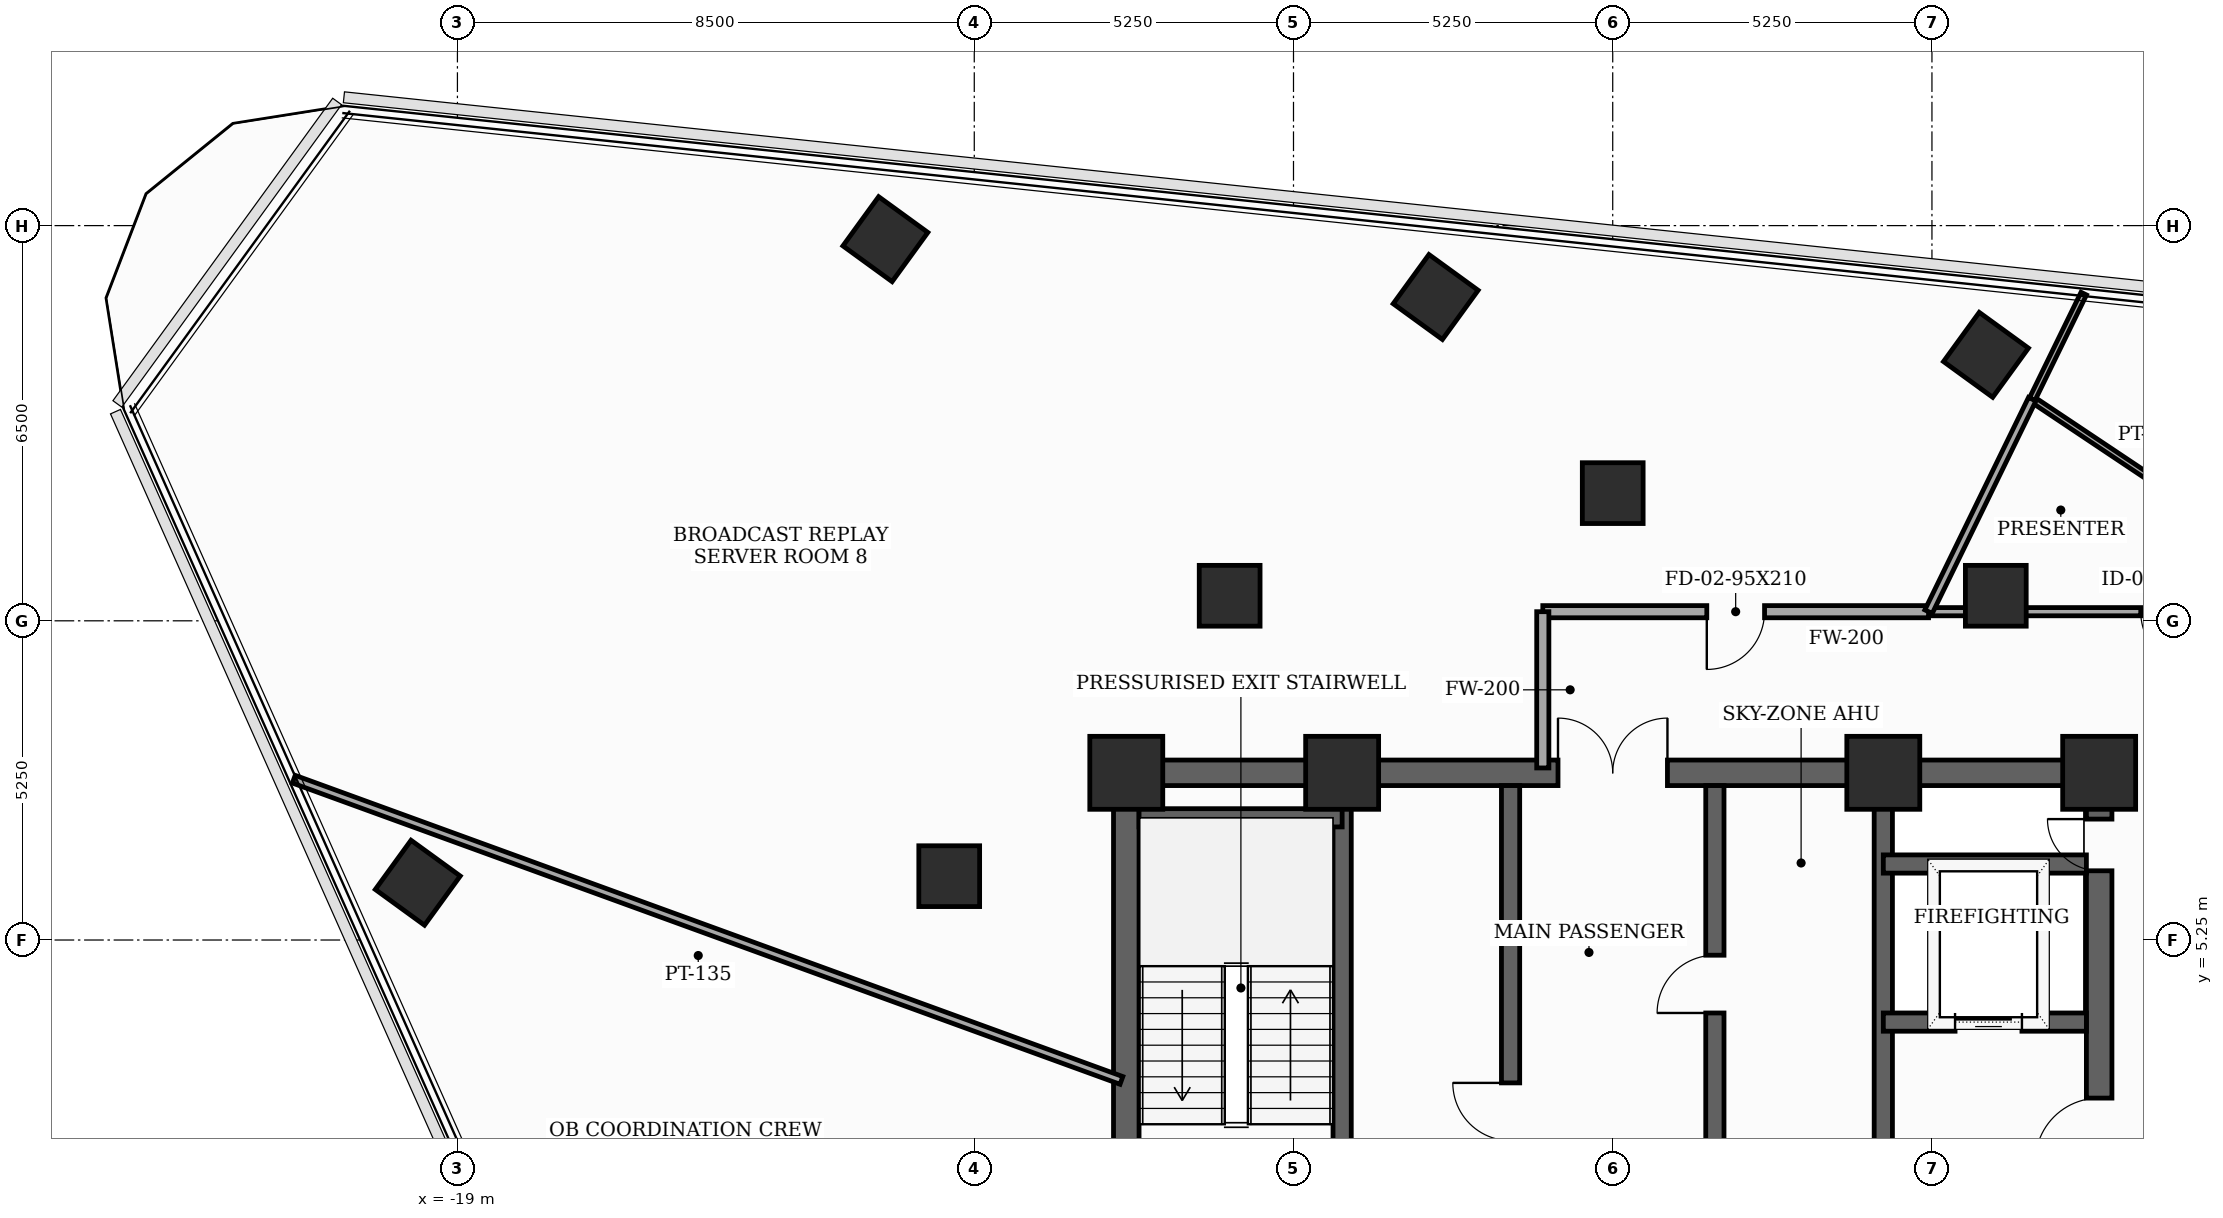
"""IFC4 building model, lengths in metres.
Left out: names, types, materials, properties, quantities, classifications, styles, units other than length and angle.
Written with IfcOpenShell. Run it as: python <this file> out.ifc"""

import sys

from ifc_helpers import new_model, si_unit, direction, frame, frame_2d, origin, origin_2d, place, context, subcontext, project, spatial, rectangle, extrude, element, fill, save


model = new_model("IFC4")
c1 = context("Model", 3, precision=1e-05, world=origin(), true_north=direction((0.0, 1.0)))
c2 = subcontext(c1, "Body", "Model", "MODEL_VIEW")
j1 = project(units=[si_unit("LENGTHUNIT", "METRE"), si_unit("PLANEANGLEUNIT", "RADIAN")], contexts=[c1])
p1 = place(None, origin())
s1 = spatial("IfcSite", under=j1, at=p1, CompositionType="ELEMENT")
p2 = place(p1, origin())
s2 = spatial("IfcBuilding", under=s1, at=p2, CompositionType="ELEMENT")
p3 = place(p2, frame((0.0, 0.0, 244.8)))
s3 = spatial("IfcBuildingStorey", under=s2, at=p3, CompositionType="ELEMENT", Elevation=244.8)
for number, where, z_axis, x_axis in (
    (1, (8.0, 8.0, 0.0), (0.0, 0.0, 1.0), (1.0, 0.0, 0.0)),
    (2, (4.45, 8.0, 0.0), (0.0, 0.0, 1.0), (1.0, 0.0, 0.0)),
    (3, (-4.45, 8.0, 0.0), (0.0, 0.0, 1.0), (1.0, 0.0, 0.0)),
    (4, (-8.0, 8.0, 0.0), (0.0, 0.0, 1.0), (1.0, 0.0, 0.0)),
):
    element("IfcColumn", number, at=place(p3, frame(where, z_axis=z_axis, x_axis=x_axis)), inside=s3, PredefinedType="COLUMN", context=c2, shape_type="SweptSolid", body=[
        extrude(rectangle(XDim=1.2, YDim=1.2, at=origin_2d()), origin(), (0.0, 0.0, 1.0), 3.7),
    ])
for number, where, z_axis, x_axis in (
    (5, (6.3, 10.912, 0.0), (0.0, 0.0, 1.0), (1.0, 0.0, 0.0)),
    (6, (0.0, 12.6, 0.0), (0.0, 0.0, 1.0), (1.0, 0.0, 0.0)),
    (7, (-6.3, 10.912, 0.0), (0.0, 0.0, 1.0), (1.0, 0.0, 0.0)),
    (8, (-10.912, 6.3, 0.0), (0.0, 0.0, 1.0), (1.0, 0.0, 0.0)),
    (9, (6.138, 14.875, 0.0), (0.0, 0.0, 1.0), (0.588, 0.809, 0.0)),
    (10, (-2.912, 15.826, 0.0), (0.0, 0.0, 1.0), (0.588, 0.809, 0.0)),
    (11, (-11.962, 16.777, 0.0), (0.0, 0.0, 1.0), (0.588, 0.809, 0.0)),
    (12, (-19.652, 6.192, 0.0), (0.0, 0.0, 1.0), (0.588, 0.809, 0.0)),
):
    element("IfcColumn", number, at=place(p3, frame(where, z_axis=z_axis, x_axis=x_axis)), inside=s3, PredefinedType="COLUMN", context=c2, shape_type="SweptSolid", body=[
        extrude(rectangle(XDim=1.0, YDim=1.0, at=origin_2d()), origin(), (0.0, 0.0, 1.0), 3.7),
    ])
p4 = place(p3, frame((-8.0, -8.0, 0.0), z_axis=(0.0, 0.0, 1.0), x_axis=(0.0, 1.0, 0.0)))
e13 = element("IfcWall", 13, at=p4, inside=s3, PredefinedType="SHEAR", context=c2, shape_type="SweptSolid", body=[
    extrude(rectangle(XDim=16.0, YDim=0.42, at=frame_2d((8.0, 0.0))), origin(), (0.0, 0.0, 1.0), 3.5),
])
p5 = place(p4, frame((0.761, 0.0, 0.0)))
e14 = element("IfcOpeningElement", 14, at=p5, cuts=e13, PredefinedType="OPENING", context=c2, shape_type="SweptSolid", body=[
    extrude(rectangle(XDim=0.85, YDim=2.02, at=frame_2d((0.425, 1.01))), frame((0.0, 0.22, 0.0), z_axis=(0.0, -1.0, 0.0), x_axis=(1.0, 0.0, 0.0)), (0.0, 0.0, 1.0), 0.44),
])
p6 = place(p4, frame((5.35, 0.0, 0.0)))
e15 = element("IfcOpeningElement", 15, at=p6, cuts=e13, PredefinedType="OPENING", context=c2, shape_type="SweptSolid", body=[
    extrude(rectangle(XDim=1.05, YDim=2.15, at=frame_2d((0.525, 1.075))), frame((0.0, 0.22, 0.0), z_axis=(0.0, -1.0, 0.0), x_axis=(1.0, 0.0, 0.0)), (0.0, 0.0, 1.0), 0.44),
])
p7 = place(p3, frame((8.0, -8.0, 0.0), z_axis=(0.0, 0.0, 1.0), x_axis=(0.0, 1.0, 0.0)))
e16 = element("IfcWall", 16, at=p7, inside=s3, PredefinedType="SHEAR", context=c2, shape_type="SweptSolid", body=[
    extrude(rectangle(XDim=16.0, YDim=0.42, at=frame_2d((8.0, 0.0))), origin(), (0.0, 0.0, 1.0), 3.5),
])
p8 = place(p7, frame((9.6, 0.0, 0.0)))
e17 = element("IfcOpeningElement", 17, at=p8, cuts=e16, PredefinedType="OPENING", context=c2, shape_type="SweptSolid", body=[
    extrude(rectangle(XDim=1.05, YDim=2.15, at=frame_2d((0.525, 1.075))), frame((0.0, 0.22, 0.0), z_axis=(0.0, -1.0, 0.0), x_axis=(1.0, 0.0, 0.0)), (0.0, 0.0, 1.0), 0.44),
])
p9 = place(p7, frame((14.389, 0.0, 0.0)))
e18 = element("IfcOpeningElement", 18, at=p9, cuts=e16, PredefinedType="OPENING", context=c2, shape_type="SweptSolid", body=[
    extrude(rectangle(XDim=0.85, YDim=2.02, at=frame_2d((0.425, 1.01))), frame((0.0, 0.22, 0.0), z_axis=(0.0, -1.0, 0.0), x_axis=(1.0, 0.0, 0.0)), (0.0, 0.0, 1.0), 0.44),
])
p10 = place(p3, frame((-8.0, 8.0, 0.0), z_axis=(0.0, 0.0, 1.0), x_axis=(1.0, 0.0, 0.0)))
e19 = element("IfcWall", 19, at=p10, inside=s3, PredefinedType="SHEAR", context=c2, shape_type="SweptSolid", body=[
    extrude(rectangle(XDim=16.0, YDim=0.42, at=frame_2d((8.0, 0.0))), origin(), (0.0, 0.0, 1.0), 3.5),
])
p11 = place(p10, frame((7.1, 0.0, 0.0)))
e20 = element("IfcOpeningElement", 20, at=p11, cuts=e19, PredefinedType="OPENING", context=c2, shape_type="SweptSolid", body=[
    extrude(rectangle(XDim=1.8, YDim=2.15, at=frame_2d((0.9, 1.075))), frame((0.0, 0.22, 0.0), z_axis=(0.0, -1.0, 0.0), x_axis=(1.0, 0.0, 0.0)), (0.0, 0.0, 1.0), 0.44),
])
for number, where, z_axis, x_axis in (
    (21, (-4.45, -7.79, 0.0), (0.0, 0.0, 1.0), (0.0, 1.0, 0.0)),
    (22, (4.45, -7.79, 0.0), (0.0, 0.0, 1.0), (0.0, 1.0, 0.0)),
):
    element("IfcWall", number, at=place(p3, frame(where, z_axis=z_axis, x_axis=x_axis)), inside=s3, PredefinedType="SHEAR", context=c2, shape_type="SweptSolid", body=[
        extrude(rectangle(XDim=15.58, YDim=0.3, at=frame_2d((7.79, 0.0))), origin(), (0.0, 0.0, 1.0), 3.5),
    ])
p12 = place(p3, frame((-7.79, 7.26, 0.0), z_axis=(0.0, 0.0, 1.0), x_axis=(1.0, 0.0, 0.0)))
e23 = element("IfcWall", 23, at=p12, inside=s3, PredefinedType="SHEAR", context=c2, shape_type="SweptSolid", body=[
    extrude(rectangle(XDim=3.34, YDim=0.3, at=frame_2d((1.67, 0.0))), origin(), (0.0, 0.0, 1.0), 3.5),
])
p13 = place(p3, frame((4.45, 3.9, 0.0), z_axis=(0.0, 0.0, 1.0), x_axis=(1.0, 0.0, 0.0)))
e24 = element("IfcWall", 24, at=p13, inside=s3, PredefinedType="SHEAR", context=c2, shape_type="SweptSolid", body=[
    extrude(rectangle(XDim=3.34, YDim=0.3, at=frame_2d((1.67, 0.0))), origin(), (0.0, 0.0, 1.0), 3.5),
])
p14 = place(p13, frame((1.18, 0.0, 0.0)))
e25 = element("IfcOpeningElement", 25, at=p14, cuts=e24, PredefinedType="OPENING", context=c2, shape_type="SweptSolid", body=[
    extrude(rectangle(XDim=1.1, YDim=2.1, at=frame_2d((0.55, 1.05))), frame((0.0, 0.16, 0.0), z_axis=(0.0, -1.0, 0.0), x_axis=(1.0, 0.0, 0.0)), (0.0, 0.0, 1.0), 0.32),
])
p15 = place(p3, frame((4.45, 6.5, 0.0), z_axis=(0.0, 0.0, 1.0), x_axis=(1.0, 0.0, 0.0)))
e26 = element("IfcWall", 26, at=p15, inside=s3, PredefinedType="SHEAR", context=c2, shape_type="SweptSolid", body=[
    extrude(rectangle(XDim=3.34, YDim=0.3, at=frame_2d((1.67, 0.0))), origin(), (0.0, 0.0, 1.0), 3.5),
])
p16 = place(p3, frame((-1.68, -4.85, 0.0), z_axis=(0.0, 0.0, 1.0), x_axis=(0.0, 1.0, 0.0)))
e27 = element("IfcWall", 27, at=p16, inside=s3, PredefinedType="SHEAR", context=c2, shape_type="SweptSolid", body=[
    extrude(rectangle(XDim=12.64, YDim=0.3, at=frame_2d((6.32, 0.0))), origin(), (0.0, 0.0, 1.0), 3.5),
])
p17 = place(p16, frame((1.05, 0.0, 0.0)))
e28 = element("IfcOpeningElement", 28, at=p17, cuts=e27, PredefinedType="OPENING", context=c2, shape_type="SweptSolid", body=[
    extrude(rectangle(XDim=0.85, YDim=2.02, at=frame_2d((0.425, 1.01))), frame((0.0, 0.16, 0.0), z_axis=(0.0, -1.0, 0.0), x_axis=(1.0, 0.0, 0.0)), (0.0, 0.0, 1.0), 0.32),
])
p18 = place(p16, frame((6.8, 0.0, 0.0)))
e29 = element("IfcOpeningElement", 29, at=p18, cuts=e27, PredefinedType="OPENING", context=c2, shape_type="SweptSolid", body=[
    extrude(rectangle(XDim=0.95, YDim=2.1, at=frame_2d((0.475, 1.05))), frame((0.0, 0.16, 0.0), z_axis=(0.0, -1.0, 0.0), x_axis=(1.0, 0.0, 0.0)), (0.0, 0.0, 1.0), 0.32),
])
p19 = place(p3, frame((1.68, -4.85, 0.0), z_axis=(0.0, 0.0, 1.0), x_axis=(0.0, 1.0, 0.0)))
e30 = element("IfcWall", 30, at=p19, inside=s3, PredefinedType="SHEAR", context=c2, shape_type="SweptSolid", body=[
    extrude(rectangle(XDim=12.64, YDim=0.3, at=frame_2d((6.32, 0.0))), origin(), (0.0, 0.0, 1.0), 3.5),
])
p20 = place(p19, frame((0.55, 0.0, 0.0)))
e31 = element("IfcOpeningElement", 31, at=p20, cuts=e30, PredefinedType="OPENING", context=c2, shape_type="SweptSolid", body=[
    extrude(rectangle(XDim=1.1, YDim=2.1, at=frame_2d((0.55, 1.05))), frame((0.0, 0.16, 0.0), z_axis=(0.0, -1.0, 0.0), x_axis=(1.0, 0.0, 0.0)), (0.0, 0.0, 1.0), 0.32),
])
p21 = place(p19, frame((2.65, 0.0, 0.0)))
e32 = element("IfcOpeningElement", 32, at=p21, cuts=e30, PredefinedType="OPENING", context=c2, shape_type="SweptSolid", body=[
    extrude(rectangle(XDim=1.1, YDim=2.1, at=frame_2d((0.55, 1.05))), frame((0.0, 0.16, 0.0), z_axis=(0.0, -1.0, 0.0), x_axis=(1.0, 0.0, 0.0)), (0.0, 0.0, 1.0), 0.32),
])
p22 = place(p19, frame((4.75, 0.0, 0.0)))
e33 = element("IfcOpeningElement", 33, at=p22, cuts=e30, PredefinedType="OPENING", context=c2, shape_type="SweptSolid", body=[
    extrude(rectangle(XDim=1.1, YDim=2.1, at=frame_2d((0.55, 1.05))), frame((0.0, 0.16, 0.0), z_axis=(0.0, -1.0, 0.0), x_axis=(1.0, 0.0, 0.0)), (0.0, 0.0, 1.0), 0.32),
])
p23 = place(p19, frame((8.9, 0.0, 0.0)))
e34 = element("IfcOpeningElement", 34, at=p23, cuts=e30, PredefinedType="OPENING", context=c2, shape_type="SweptSolid", body=[
    extrude(rectangle(XDim=0.95, YDim=2.1, at=frame_2d((0.475, 1.05))), frame((0.0, 0.16, 0.0), z_axis=(0.0, -1.0, 0.0), x_axis=(1.0, 0.0, 0.0)), (0.0, 0.0, 1.0), 0.32),
])
p24 = place(p3, frame((10.15, 10.65, 0.0), z_axis=(0.0, 0.0, 1.0), x_axis=(-1.0, 0.0, 0.0)))
e35 = element("IfcWall", 35, at=p24, inside=s3, PredefinedType="PARTITIONING", context=c2, shape_type="SweptSolid", body=[
    extrude(rectangle(XDim=4.956, YDim=0.135, at=frame_2d((2.478, 0.0))), origin(), (0.0, 0.0, 1.0), 2.885),
])
p25 = place(p24, frame((0.516, 0.0, 0.0)))
e36 = element("IfcOpeningElement", 36, at=p25, cuts=e35, PredefinedType="OPENING", context=c2, shape_type="SweptSolid", body=[
    extrude(rectangle(XDim=0.95, YDim=2.1, at=frame_2d((0.475, 1.05))), frame((0.0, 0.077, 0.0), z_axis=(0.0, -1.0, 0.0), x_axis=(1.0, 0.0, 0.0)), (0.0, 0.0, 1.0), 0.155),
])
p26 = place(p3, frame((5.194, 10.65, 0.0), z_axis=(0.0, 0.0, 1.0), x_axis=(-1.0, 0.0, 0.0)))
e37 = element("IfcWall", 37, at=p26, inside=s3, PredefinedType="SOLIDWALL", context=c2, shape_type="SweptSolid", body=[
    extrude(rectangle(XDim=6.344, YDim=0.2, at=frame_2d((3.172, 0.0))), origin(), (0.0, 0.0, 1.0), 2.885),
])
p27 = place(p26, frame((2.697, 0.0, 0.0)))
e38 = element("IfcOpeningElement", 38, at=p27, cuts=e37, PredefinedType="OPENING", context=c2, shape_type="SweptSolid", body=[
    extrude(rectangle(XDim=0.95, YDim=2.1, at=frame_2d((0.475, 1.05))), frame((0.0, 0.11, 0.0), z_axis=(0.0, -1.0, 0.0), x_axis=(1.0, 0.0, 0.0)), (0.0, 0.0, 1.0), 0.22),
])
p28 = place(p3, frame((-1.15, 10.65, 0.0), z_axis=(0.0, 0.0, 1.0), x_axis=(0.0, -1.0, 0.0)))
e39 = element("IfcWall", 39, at=p28, inside=s3, PredefinedType="SOLIDWALL", context=c2, shape_type="SweptSolid", body=[
    extrude(rectangle(XDim=2.57, YDim=0.2, at=frame_2d((1.285, 0.0))), origin(), (0.0, 0.0, 1.0), 2.885),
])
p29 = place(p3, frame((-8.08, 2.941, 0.0), z_axis=(0.0, 0.0, 1.0), x_axis=(-0.939685602892, 0.342039424216, 0.0)))
e40 = element("IfcWall", 40, at=p29, inside=s3, PredefinedType="PARTITIONING", context=c2, shape_type="SweptSolid", body=[
    extrude(rectangle(XDim=14.485, YDim=0.135, at=frame_2d((7.242, 0.0))), origin(), (0.0, 0.0, 1.0), 2.085),
])
p30 = place(p3, frame((6.899, 14.145, 0.0), z_axis=(0.0, 0.0, 1.0), x_axis=(0.831510168033, -0.555509532283, 0.0)))
e41 = element("IfcWall", 41, at=p30, inside=s3, PredefinedType="MOVABLE", context=c2, shape_type="SweptSolid", body=[
    extrude(rectangle(XDim=4.663, YDim=0.1, at=frame_2d((2.331, 0.0))), origin(), (0.0, 0.0, 1.0), 3.5),
])
p31 = place(p3, frame((7.747, 15.882, 0.0), z_axis=(0.0, 0.0, 1.0), x_axis=(-0.438553034404, -0.898705310998, 0.0)))
e42 = element("IfcWall", 42, at=p31, inside=s3, PredefinedType="MOVABLE", context=c2, shape_type="SweptSolid", body=[
    extrude(rectangle(XDim=1.933, YDim=0.1, at=frame_2d((0.966, 0.0))), origin(), (0.0, 0.0, 1.0), 2.085),
])
p32 = place(p3, frame((6.899, 14.145, 0.0), z_axis=(0.0, 0.0, 1.0), x_axis=(-0.438402604201, -0.898778702813, 0.0)))
e43 = element("IfcWall", 43, at=p32, inside=s3, PredefinedType="PARTITIONING", context=c2, shape_type="SweptSolid", body=[
    extrude(rectangle(XDim=3.889, YDim=0.135, at=frame_2d((1.944, 0.0))), origin(), (0.0, 0.0, 1.0), 2.085),
])
p33 = place(p8, origin())
e44 = element("IfcDoor", 44, at=p33, inside=s3, OperationType="SINGLE_SWING_LEFT", PredefinedType="DOOR", context=c2, shape_type="SweptSolid", body=[
    extrude(rectangle(XDim=1.05, YDim=2.15, at=frame_2d((0.525, 1.075))), frame((0.0, 0.025, 0.0), z_axis=(0.0, -1.0, 0.0), x_axis=(1.0, 0.0, 0.0)), (0.0, 0.0, 1.0), 0.05),
])
fill(e17, e44)
p34 = place(p9, origin())
e45 = element("IfcDoor", 45, at=p34, inside=s3, OperationType="SINGLE_SWING_RIGHT", PredefinedType="TRAPDOOR", context=c2, shape_type="SweptSolid", body=[
    extrude(rectangle(XDim=0.85, YDim=2.02, at=frame_2d((0.425, 1.01))), frame((0.0, 0.025, 0.0), z_axis=(0.0, -1.0, 0.0), x_axis=(1.0, 0.0, 0.0)), (0.0, 0.0, 1.0), 0.05),
])
fill(e18, e45)
p35 = place(p11, origin())
e46 = element("IfcDoor", 46, at=p35, inside=s3, OperationType="DOUBLE_DOOR_SINGLE_SWING", PredefinedType="DOOR", context=c2, shape_type="SweptSolid", body=[
    extrude(rectangle(XDim=1.8, YDim=2.15, at=frame_2d((0.9, 1.075))), frame((0.0, 0.025, 0.0), z_axis=(0.0, -1.0, 0.0), x_axis=(1.0, 0.0, 0.0)), (0.0, 0.0, 1.0), 0.05),
])
fill(e20, e46)
p36 = place(p14, origin())
e47 = element("IfcDoor", 47, at=p36, inside=s3, OperationType="SLIDING_TO_LEFT", PredefinedType="DOOR", context=c2, shape_type="SweptSolid", body=[
    extrude(rectangle(XDim=1.1, YDim=2.1, at=frame_2d((0.55, 1.05))), frame((0.0, 0.025, 0.0), z_axis=(0.0, -1.0, 0.0), x_axis=(1.0, 0.0, 0.0)), (0.0, 0.0, 1.0), 0.05),
])
fill(e25, e47)
p37 = place(p18, origin())
e48 = element("IfcDoor", 48, at=p37, inside=s3, OperationType="SINGLE_SWING_RIGHT", PredefinedType="DOOR", context=c2, shape_type="SweptSolid", body=[
    extrude(rectangle(XDim=0.95, YDim=2.1, at=frame_2d((0.475, 1.05))), frame((0.0, 0.025, 0.0), z_axis=(0.0, -1.0, 0.0), x_axis=(1.0, 0.0, 0.0)), (0.0, 0.0, 1.0), 0.05),
])
fill(e29, e48)
p38 = place(p23, origin())
e49 = element("IfcDoor", 49, at=p38, inside=s3, OperationType="SINGLE_SWING_LEFT", PredefinedType="DOOR", context=c2, shape_type="SweptSolid", body=[
    extrude(rectangle(XDim=0.95, YDim=2.1, at=frame_2d((0.475, 1.05))), frame((0.0, 0.025, 0.0), z_axis=(0.0, -1.0, 0.0), x_axis=(1.0, 0.0, 0.0)), (0.0, 0.0, 1.0), 0.05),
])
fill(e34, e49)
p39 = place(p25, origin())
e50 = element("IfcDoor", 50, at=p39, inside=s3, OperationType="SINGLE_SWING_LEFT", PredefinedType="DOOR", context=c2, shape_type="SweptSolid", body=[
    extrude(rectangle(XDim=0.95, YDim=2.1, at=frame_2d((0.475, 1.05))), frame((0.0, 0.025, 0.0), z_axis=(0.0, -1.0, 0.0), x_axis=(1.0, 0.0, 0.0)), (0.0, 0.0, 1.0), 0.05),
])
fill(e36, e50)
p40 = place(p27, origin())
e51 = element("IfcDoor", 51, at=p40, inside=s3, OperationType="SINGLE_SWING_RIGHT", PredefinedType="DOOR", context=c2, shape_type="SweptSolid", body=[
    extrude(rectangle(XDim=0.95, YDim=2.1, at=frame_2d((0.475, 1.05))), frame((0.0, 0.025, 0.0), z_axis=(0.0, -1.0, 0.0), x_axis=(1.0, 0.0, 0.0)), (0.0, 0.0, 1.0), 0.05),
])
fill(e38, e51)
save(model, sys.argv[1])
